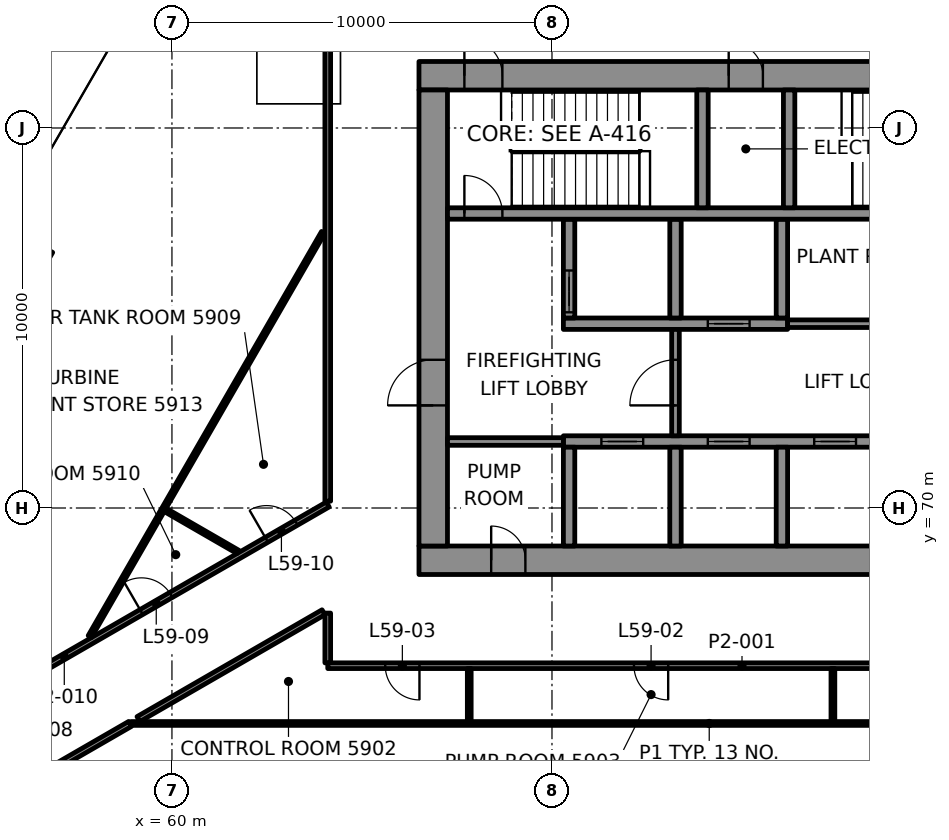
"""IFC4 building model, lengths in metres.
Left out: names, types, materials, properties, quantities, classifications, styles, units other than length and angle.
Written with IfcOpenShell. Run it as: python <this file> out.ifc"""

import sys

from ifc_helpers import new_model, si_unit, direction, frame, frame_2d, origin, origin_2d, place, context, subcontext, project, spatial, rectangle, hollow_rectangle, extrude, element, fill, save


model = new_model("IFC4")
c1 = context("Model", 3, precision=1e-05, world=origin(), true_north=direction((0.0, 1.0)))
c2 = subcontext(c1, "Body", "Model", "MODEL_VIEW")
j1 = project(units=[si_unit("LENGTHUNIT", "METRE"), si_unit("PLANEANGLEUNIT", "RADIAN")], contexts=[c1])
p1 = place(None, origin())
s1 = spatial("IfcSite", under=j1, at=p1, CompositionType="ELEMENT")
p2 = place(p1, origin())
s2 = spatial("IfcBuilding", under=s1, at=p2, CompositionType="ELEMENT")
p3 = place(p2, frame((0.0, 0.0, 252.1)))
s3 = spatial("IfcBuildingStorey", under=s2, at=p3, CompositionType="ELEMENT", Elevation=252.1)
p4 = place(p3, frame((56.229, 76.628, -0.0), z_axis=(0.0, 0.0, 1.0), x_axis=(-0.5, -0.866025403784, 0.0)))
e1 = element("IfcColumn", 1, at=p4, inside=s3, PredefinedType="COLUMN", context=c2, shape_type="SweptSolid", body=[
    extrude(hollow_rectangle(XDim=0.8, YDim=1.0, WallThickness=0.05, at=origin_2d()), origin(), (0.0, 0.0, 1.0), 4.5),
])
p5 = place(p3, frame((66.5, 68.625, 0.0), z_axis=(0.0, 0.0, 1.0), x_axis=(1.0, 0.0, 0.0)))
e2 = element("IfcWall", 2, at=p5, inside=s3, PredefinedType="SHEAR", context=c2, shape_type="SweptSolid", body=[
    extrude(rectangle(XDim=17.0, YDim=0.75, at=frame_2d((8.5, 0.0))), origin(), (0.0, 0.0, 1.0), 4.3),
])
p6 = place(p5, frame((1.9, 0.0, 0.0)))
e3 = element("IfcOpeningElement", 3, at=p6, cuts=e2, PredefinedType="OPENING", context=c2, shape_type="SweptSolid", body=[
    extrude(rectangle(XDim=0.9, YDim=2.1, at=frame_2d((0.45, 1.05))), frame((0.0, 0.385, 0.0), z_axis=(0.0, -1.0, 0.0), x_axis=(1.0, 0.0, 0.0)), (0.0, 0.0, 1.0), 0.77),
])
p7 = place(p3, frame((66.5, 81.375, 0.0), z_axis=(0.0, 0.0, 1.0), x_axis=(1.0, 0.0, 0.0)))
e4 = element("IfcWall", 4, at=p7, inside=s3, PredefinedType="SHEAR", context=c2, shape_type="SweptSolid", body=[
    extrude(rectangle(XDim=17.0, YDim=0.75, at=frame_2d((8.5, 0.0))), origin(), (0.0, 0.0, 1.0), 4.3),
])
p8 = place(p7, frame((1.195, 0.0, 0.0)))
e5 = element("IfcOpeningElement", 5, at=p8, cuts=e4, PredefinedType="OPENING", context=c2, shape_type="SweptSolid", body=[
    extrude(rectangle(XDim=1.0, YDim=2.1, at=frame_2d((0.5, 1.05))), frame((0.0, 0.385, 0.0), z_axis=(0.0, -1.0, 0.0), x_axis=(1.0, 0.0, 0.0)), (0.0, 0.0, 1.0), 0.77),
])
p9 = place(p7, frame((15.005, 0.0, 0.0)))
e6 = element("IfcOpeningElement", 6, at=p9, cuts=e4, PredefinedType="OPENING", context=c2, shape_type="SweptSolid", body=[
    extrude(rectangle(XDim=1.0, YDim=2.1, at=frame_2d((0.5, 1.05))), frame((0.0, 0.385, 0.0), z_axis=(0.0, -1.0, 0.0), x_axis=(1.0, 0.0, 0.0)), (0.0, 0.0, 1.0), 0.77),
])
p10 = place(p7, frame((8.15, 0.0, 0.0)))
e7 = element("IfcOpeningElement", 7, at=p10, cuts=e4, PredefinedType="OPENING", context=c2, shape_type="SweptSolid", body=[
    extrude(rectangle(XDim=0.9, YDim=2.1, at=frame_2d((0.45, 1.05))), frame((0.0, 0.385, 0.0), z_axis=(0.0, -1.0, 0.0), x_axis=(1.0, 0.0, 0.0)), (0.0, 0.0, 1.0), 0.77),
])
p11 = place(p3, frame((66.875, 69.0, 0.0), z_axis=(0.0, 0.0, 1.0), x_axis=(0.0, 1.0, 0.0)))
e8 = element("IfcWall", 8, at=p11, inside=s3, PredefinedType="SHEAR", context=c2, shape_type="SweptSolid", body=[
    extrude(rectangle(XDim=12.0, YDim=0.75, at=frame_2d((6.0, 0.0))), origin(), (0.0, 0.0, 1.0), 4.3),
])
p12 = place(p11, frame((3.7, 0.0, 0.0)))
e9 = element("IfcOpeningElement", 9, at=p12, cuts=e8, PredefinedType="OPENING", context=c2, shape_type="SweptSolid", body=[
    extrude(rectangle(XDim=1.2, YDim=2.1, at=frame_2d((0.6, 1.05))), frame((0.0, 0.385, 0.0), z_axis=(0.0, -1.0, 0.0), x_axis=(1.0, 0.0, 0.0)), (0.0, 0.0, 1.0), 0.77),
])
p13 = place(p3, frame((70.3, 71.75, 0.0), z_axis=(0.0, 0.0, 1.0), x_axis=(1.0, 0.0, 0.0)))
e10 = element("IfcWall", 10, at=p13, inside=s3, PredefinedType="SHEAR", context=c2, shape_type="SweptSolid", body=[
    extrude(rectangle(XDim=11.5, YDim=0.3, at=frame_2d((5.75, 0.0))), origin(), (0.0, 0.0, 1.0), 4.3),
])
p14 = place(p13, frame((1.0, 0.0, 0.0)))
e11 = element("IfcOpeningElement", 11, at=p14, cuts=e10, PredefinedType="OPENING", context=c2, shape_type="SweptSolid", body=[
    extrude(rectangle(XDim=1.1, YDim=2.1, at=frame_2d((0.55, 1.05))), frame((0.0, 0.16, 0.0), z_axis=(0.0, -1.0, 0.0), x_axis=(1.0, 0.0, 0.0)), (0.0, 0.0, 1.0), 0.32),
])
p15 = place(p13, frame((3.8, 0.0, 0.0)))
e12 = element("IfcOpeningElement", 12, at=p15, cuts=e10, PredefinedType="OPENING", context=c2, shape_type="SweptSolid", body=[
    extrude(rectangle(XDim=1.1, YDim=2.1, at=frame_2d((0.55, 1.05))), frame((0.0, 0.16, 0.0), z_axis=(0.0, -1.0, 0.0), x_axis=(1.0, 0.0, 0.0)), (0.0, 0.0, 1.0), 0.32),
])
p16 = place(p13, frame((6.6, 0.0, 0.0)))
e13 = element("IfcOpeningElement", 13, at=p16, cuts=e10, PredefinedType="OPENING", context=c2, shape_type="SweptSolid", body=[
    extrude(rectangle(XDim=1.1, YDim=2.1, at=frame_2d((0.55, 1.05))), frame((0.0, 0.16, 0.0), z_axis=(0.0, -1.0, 0.0), x_axis=(1.0, 0.0, 0.0)), (0.0, 0.0, 1.0), 0.32),
])
p17 = place(p13, frame((9.4, 0.0, 0.0)))
e14 = element("IfcOpeningElement", 14, at=p17, cuts=e10, PredefinedType="OPENING", context=c2, shape_type="SweptSolid", body=[
    extrude(rectangle(XDim=1.1, YDim=2.1, at=frame_2d((0.55, 1.05))), frame((0.0, 0.16, 0.0), z_axis=(0.0, -1.0, 0.0), x_axis=(1.0, 0.0, 0.0)), (0.0, 0.0, 1.0), 0.32),
])
p18 = place(p3, frame((70.3, 74.85, 0.0), z_axis=(0.0, 0.0, 1.0), x_axis=(1.0, 0.0, 0.0)))
e15 = element("IfcWall", 15, at=p18, inside=s3, PredefinedType="SHEAR", context=c2, shape_type="SweptSolid", body=[
    extrude(rectangle(XDim=5.9, YDim=0.3, at=frame_2d((2.95, 0.0))), origin(), (0.0, 0.0, 1.0), 4.3),
])
p19 = place(p18, frame((3.8, 0.0, 0.0)))
e16 = element("IfcOpeningElement", 16, at=p19, cuts=e15, PredefinedType="OPENING", context=c2, shape_type="SweptSolid", body=[
    extrude(rectangle(XDim=1.1, YDim=2.1, at=frame_2d((0.55, 1.05))), frame((0.0, 0.16, 0.0), z_axis=(0.0, -1.0, 0.0), x_axis=(1.0, 0.0, 0.0)), (0.0, 0.0, 1.0), 0.32),
])
p20 = place(p3, frame((70.45, 69.0, 0.0), z_axis=(0.0, 0.0, 1.0), x_axis=(0.0, 1.0, 0.0)))
e17 = element("IfcWall", 17, at=p20, inside=s3, PredefinedType="SHEAR", context=c2, shape_type="SweptSolid", body=[
    extrude(rectangle(XDim=2.6, YDim=0.3, at=frame_2d((1.3, 0.0))), origin(), (0.0, 0.0, 1.0), 4.3),
])
p21 = place(p3, frame((70.45, 75.0, 0.0), z_axis=(0.0, 0.0, 1.0), x_axis=(0.0, 1.0, 0.0)))
e18 = element("IfcWall", 18, at=p21, inside=s3, PredefinedType="SHEAR", context=c2, shape_type="SweptSolid", body=[
    extrude(rectangle(XDim=2.6, YDim=0.3, at=frame_2d((1.3, 0.0))), origin(), (0.0, 0.0, 1.0), 4.3),
])
p22 = place(p21, frame((0.15, 0.0, 0.0)))
e19 = element("IfcOpeningElement", 19, at=p22, cuts=e18, PredefinedType="OPENING", context=c2, shape_type="SweptSolid", body=[
    extrude(rectangle(XDim=1.1, YDim=2.1, at=frame_2d((0.55, 1.05))), frame((0.0, 0.16, 0.0), z_axis=(0.0, -1.0, 0.0), x_axis=(1.0, 0.0, 0.0)), (0.0, 0.0, 1.0), 0.32),
])
for number, where, z_axis, x_axis in (
    (20, (73.25, 69.0, 0.0), (0.0, 0.0, 1.0), (0.0, 1.0, 0.0)),
    (21, (73.25, 75.0, 0.0), (0.0, 0.0, 1.0), (0.0, 1.0, 0.0)),
    (22, (76.05, 69.0, 0.0), (0.0, 0.0, 1.0), (0.0, 1.0, 0.0)),
    (23, (76.05, 75.0, 0.0), (0.0, 0.0, 1.0), (0.0, 1.0, 0.0)),
):
    element("IfcWall", number, at=place(p3, frame(where, z_axis=z_axis, x_axis=x_axis)), inside=s3, PredefinedType="SHEAR", context=c2, shape_type="SweptSolid", body=[
        extrude(rectangle(XDim=2.6, YDim=0.3, at=frame_2d((1.3, 0.0))), origin(), (0.0, 0.0, 1.0), 4.3),
    ])
p23 = place(p3, frame((67.25, 77.75, 0.0), z_axis=(0.0, 0.0, 1.0), x_axis=(1.0, 0.0, 0.0)))
e24 = element("IfcWall", 24, at=p23, inside=s3, PredefinedType="SHEAR", context=c2, shape_type="SweptSolid", body=[
    extrude(rectangle(XDim=15.5, YDim=0.3, at=frame_2d((7.75, 0.0))), origin(), (0.0, 0.0, 1.0), 4.3),
])
p24 = place(p23, frame((0.445, 0.0, 0.0)))
e25 = element("IfcOpeningElement", 25, at=p24, cuts=e24, PredefinedType="OPENING", context=c2, shape_type="SweptSolid", body=[
    extrude(rectangle(XDim=1.0, YDim=2.1, at=frame_2d((0.5, 1.05))), frame((0.0, 0.16, 0.0), z_axis=(0.0, -1.0, 0.0), x_axis=(1.0, 0.0, 0.0)), (0.0, 0.0, 1.0), 0.32),
])
for number, where, z_axis, x_axis in (
    (26, (73.96, 77.9, 0.0), (0.0, 0.0, 1.0), (0.0, 1.0, 0.0)),
    (27, (76.24, 77.9, 0.0), (0.0, 0.0, 1.0), (0.0, 1.0, 0.0)),
):
    element("IfcWall", number, at=place(p3, frame(where, z_axis=z_axis, x_axis=x_axis)), inside=s3, PredefinedType="SHEAR", context=c2, shape_type="SweptSolid", body=[
        extrude(rectangle(XDim=3.1, YDim=0.3, at=frame_2d((1.55, 0.0))), origin(), (0.0, 0.0, 1.0), 4.3),
    ])
p25 = place(p3, frame((58.921, 64.33, 0.0), z_axis=(0.0, 0.0, 1.0), x_axis=(1.0, 0.0, 0.0)))
e28 = element("IfcWall", 28, at=p25, inside=s3, PredefinedType="PARTITIONING", context=c2, shape_type="SweptSolid", body=[
    extrude(rectangle(XDim=30.434, YDim=0.1, at=frame_2d((15.217, 0.0))), origin(), (0.0, 0.0, 1.0), 3.7),
])
p26 = place(p3, frame((85.9, 65.85, 0.0), z_axis=(0.0, 0.0, 1.0), x_axis=(-1.0, 0.0, 0.0)))
e29 = element("IfcWall", 29, at=p26, inside=s3, PredefinedType="PARTITIONING", context=c2, shape_type="SweptSolid", body=[
    extrude(rectangle(XDim=21.8, YDim=0.15, at=frame_2d((10.9, 0.0))), origin(), (0.0, 0.0, 1.0), 3.7),
])
p27 = place(p26, frame((3.905, 0.0, 0.0)))
e30 = element("IfcOpeningElement", 30, at=p27, cuts=e29, PredefinedType="OPENING", context=c2, shape_type="SweptSolid", body=[
    extrude(rectangle(XDim=0.9, YDim=2.1, at=frame_2d((0.45, 1.05))), frame((0.0, 0.085, 0.0), z_axis=(0.0, -1.0, 0.0), x_axis=(1.0, 0.0, 0.0)), (0.0, 0.0, 1.0), 0.17),
])
p28 = place(p26, frame((12.843, 0.0, 0.0)))
e31 = element("IfcOpeningElement", 31, at=p28, cuts=e29, PredefinedType="OPENING", context=c2, shape_type="SweptSolid", body=[
    extrude(rectangle(XDim=0.9, YDim=2.1, at=frame_2d((0.45, 1.05))), frame((0.0, 0.085, 0.0), z_axis=(0.0, -1.0, 0.0), x_axis=(1.0, 0.0, 0.0)), (0.0, 0.0, 1.0), 0.17),
])
p29 = place(p26, frame((19.387, 0.0, 0.0)))
e32 = element("IfcOpeningElement", 32, at=p29, cuts=e29, PredefinedType="OPENING", context=c2, shape_type="SweptSolid", body=[
    extrude(rectangle(XDim=0.9, YDim=2.1, at=frame_2d((0.45, 1.05))), frame((0.0, 0.085, 0.0), z_axis=(0.0, -1.0, 0.0), x_axis=(1.0, 0.0, 0.0)), (0.0, 0.0, 1.0), 0.17),
])
p30 = place(p3, frame((58.899, 64.318, 0.0), z_axis=(0.0, 0.0, 1.0), x_axis=(-0.866035440363, -0.499982615733, 0.0)))
e33 = element("IfcWall", 33, at=p30, inside=s3, PredefinedType="PARTITIONING", context=c2, shape_type="SweptSolid", body=[
    extrude(rectangle(XDim=7.419, YDim=0.15, at=frame_2d((3.709, 0.0))), origin(), (0.0, 0.0, 1.0), 3.7),
])
p31 = place(p30, frame((3.3, 0.0, 0.0)))
e34 = element("IfcOpeningElement", 34, at=p31, cuts=e33, PredefinedType="OPENING", context=c2, shape_type="SweptSolid", body=[
    extrude(rectangle(XDim=1.2, YDim=2.1, at=frame_2d((0.6, 1.05))), frame((0.0, 0.085, 0.0), z_axis=(0.0, -1.0, 0.0), x_axis=(1.0, 0.0, 0.0)), (0.0, 0.0, 1.0), 0.17),
])
p32 = place(p3, frame((50.234, 62.087, 0.0), z_axis=(0.0, 0.0, 1.0), x_axis=(0.866022819081, 0.500004476811, 0.0)))
e35 = element("IfcWall", 35, at=p32, inside=s3, PredefinedType="PARTITIONING", context=c2, shape_type="SweptSolid", body=[
    extrude(rectangle(XDim=16.011, YDim=0.15, at=frame_2d((8.005, 0.0))), origin(), (0.0, 0.0, 1.0), 3.7),
])
p33 = place(p32, frame((10.35, 0.0, 0.0)))
e36 = element("IfcOpeningElement", 36, at=p33, cuts=e35, PredefinedType="OPENING", context=c2, shape_type="SweptSolid", body=[
    extrude(rectangle(XDim=0.9, YDim=2.1, at=frame_2d((0.45, 1.05))), frame((0.0, 0.085, 0.0), z_axis=(0.0, -1.0, 0.0), x_axis=(1.0, 0.0, 0.0)), (0.0, 0.0, 1.0), 0.17),
])
p34 = place(p32, frame((14.153, 0.0, 0.0)))
e37 = element("IfcOpeningElement", 37, at=p34, cuts=e35, PredefinedType="OPENING", context=c2, shape_type="SweptSolid", body=[
    extrude(rectangle(XDim=0.9, YDim=2.1, at=frame_2d((0.45, 1.05))), frame((0.0, 0.085, 0.0), z_axis=(0.0, -1.0, 0.0), x_axis=(1.0, 0.0, 0.0)), (0.0, 0.0, 1.0), 0.17),
])
p35 = place(p3, frame((57.839, 66.616, 0.0), z_axis=(0.0, 0.0, 1.0), x_axis=(0.500008659119, 0.866020404382, 0.0)))
e38 = element("IfcWall", 38, at=p35, inside=s3, PredefinedType="PARTITIONING", context=c2, shape_type="SweptSolid", body=[
    extrude(rectangle(XDim=12.282, YDim=0.1, at=frame_2d((6.141, 0.0))), origin(), (0.0, 0.0, 1.0), 3.7),
])
for number, where, z_axis, x_axis in (
    (39, (77.392, 64.39, 0.0), (0.0, 0.0, 1.0), (0.0, 1.0, 0.0)),
    (40, (67.823, 64.39, 0.0), (0.0, 0.0, 1.0), (0.0, 1.0, 0.0)),
):
    element("IfcWall", number, at=place(p3, frame(where, z_axis=z_axis, x_axis=x_axis)), inside=s3, PredefinedType="PARTITIONING", context=c2, shape_type="SweptSolid", body=[
        extrude(rectangle(XDim=1.385, YDim=0.1, at=frame_2d((0.692, 0.0))), origin(), (0.0, 0.0, 1.0), 3.7),
    ])
p36 = place(p3, frame((64.1, 65.925, 0.0), z_axis=(0.0, 0.0, 1.0), x_axis=(0.0, 1.0, 0.0)))
e41 = element("IfcWall", 41, at=p36, inside=s3, PredefinedType="PARTITIONING", context=c2, shape_type="SweptSolid", body=[
    extrude(rectangle(XDim=1.31, YDim=0.15, at=frame_2d((0.655, 0.0))), origin(), (0.0, 0.0, 1.0), 3.7),
])
p37 = place(p3, frame((64.1, 70.179, 0.0), z_axis=(0.0, 0.0, 1.0), x_axis=(0.0, 1.0, 0.0)))
e42 = element("IfcWall", 42, at=p37, inside=s3, PredefinedType="PARTITIONING", context=c2, shape_type="SweptSolid", body=[
    extrude(rectangle(XDim=13.971, YDim=0.15, at=frame_2d((6.985, 0.0))), origin(), (0.0, 0.0, 1.0), 3.7),
])
p38 = place(p3, frame((61.736, 68.844, 0.0), z_axis=(0.0, 0.0, 1.0), x_axis=(-0.866023045711, 0.500004084281, 0.0)))
e43 = element("IfcWall", 43, at=p38, inside=s3, PredefinedType="PARTITIONING", context=c2, shape_type="SweptSolid", body=[
    extrude(rectangle(XDim=2.201, YDim=0.1, at=frame_2d((1.101, 0.0))), origin(), (0.0, 0.0, 1.0), 3.7),
])
p39 = place(p3, frame((59.118, 64.445, 0.0), z_axis=(0.0, 0.0, 1.0), x_axis=(0.866030125237, 0.499991822116, 0.0)))
e44 = element("IfcWall", 44, at=p39, inside=s3, PredefinedType="PARTITIONING", context=c2, shape_type="SweptSolid", body=[
    extrude(rectangle(XDim=5.623, YDim=0.15, at=frame_2d((2.811, 0.0))), origin(), (0.0, 0.0, 1.0), 3.7),
])
p40 = place(p3, frame((67.25, 71.75, 0.0), z_axis=(0.0, 0.0, 1.0), x_axis=(1.0, 0.0, 0.0)))
e45 = element("IfcWall", 45, at=p40, inside=s3, PredefinedType="PARTITIONING", context=c2, shape_type="SweptSolid", body=[
    extrude(rectangle(XDim=3.05, YDim=0.2, at=frame_2d((1.525, 0.0))), origin(), (0.0, 0.0, 1.0), 4.3),
])
p41 = place(p3, frame((76.2, 74.85, 0.0), z_axis=(0.0, 0.0, 1.0), x_axis=(1.0, 0.0, 0.0)))
e46 = element("IfcWall", 46, at=p41, inside=s3, PredefinedType="PARTITIONING", context=c2, shape_type="SweptSolid", body=[
    extrude(rectangle(XDim=6.55, YDim=0.2, at=frame_2d((3.275, 0.0))), origin(), (0.0, 0.0, 1.0), 4.3),
])
p42 = place(p41, frame((2.2, 0.0, 0.0)))
e47 = element("IfcOpeningElement", 47, at=p42, cuts=e46, PredefinedType="OPENING", context=c2, shape_type="SweptSolid", body=[
    extrude(rectangle(XDim=0.9, YDim=2.1, at=frame_2d((0.45, 1.05))), frame((0.0, 0.11, 0.0), z_axis=(0.0, -1.0, 0.0), x_axis=(1.0, 0.0, 0.0)), (0.0, 0.0, 1.0), 0.22),
])
p43 = place(p3, frame((73.25, 71.9, 0.0), z_axis=(0.0, 0.0, 1.0), x_axis=(0.0, 1.0, 0.0)))
e48 = element("IfcWall", 48, at=p43, inside=s3, PredefinedType="PARTITIONING", context=c2, shape_type="SweptSolid", body=[
    extrude(rectangle(XDim=2.8, YDim=0.2, at=frame_2d((1.4, 0.0))), origin(), (0.0, 0.0, 1.0), 4.3),
])
p44 = place(p43, frame((0.8, 0.0, 0.0)))
e49 = element("IfcOpeningElement", 49, at=p44, cuts=e48, PredefinedType="OPENING", context=c2, shape_type="SweptSolid", body=[
    extrude(rectangle(XDim=1.2, YDim=2.1, at=frame_2d((0.6, 1.05))), frame((0.0, 0.11, 0.0), z_axis=(0.0, -1.0, 0.0), x_axis=(1.0, 0.0, 0.0)), (0.0, 0.0, 1.0), 0.22),
])
p45 = place(p28, origin())
e50 = element("IfcDoor", 50, at=p45, inside=s3, OperationType="SINGLE_SWING_LEFT", PredefinedType="DOOR", context=c2, shape_type="SweptSolid", body=[
    extrude(rectangle(XDim=0.9, YDim=2.1, at=frame_2d((0.45, 1.05))), frame((0.0, 0.025, 0.0), z_axis=(0.0, -1.0, 0.0), x_axis=(1.0, 0.0, 0.0)), (0.0, 0.0, 1.0), 0.05),
])
fill(e31, e50)
p46 = place(p29, origin())
e51 = element("IfcDoor", 51, at=p46, inside=s3, OperationType="SINGLE_SWING_RIGHT", PredefinedType="DOOR", context=c2, shape_type="SweptSolid", body=[
    extrude(rectangle(XDim=0.9, YDim=2.1, at=frame_2d((0.45, 1.05))), frame((0.0, 0.025, 0.0), z_axis=(0.0, -1.0, 0.0), x_axis=(1.0, 0.0, 0.0)), (0.0, 0.0, 1.0), 0.05),
])
fill(e32, e51)
p47 = place(p33, origin())
e52 = element("IfcDoor", 52, at=p47, inside=s3, OperationType="SINGLE_SWING_LEFT", PredefinedType="DOOR", context=c2, shape_type="SweptSolid", body=[
    extrude(rectangle(XDim=0.9, YDim=2.1, at=frame_2d((0.45, 1.05))), frame((0.0, 0.025, 0.0), z_axis=(0.0, -1.0, 0.0), x_axis=(1.0, 0.0, 0.0)), (0.0, 0.0, 1.0), 0.05),
])
fill(e36, e52)
p48 = place(p34, origin())
e53 = element("IfcDoor", 53, at=p48, inside=s3, OperationType="SINGLE_SWING_RIGHT", PredefinedType="DOOR", context=c2, shape_type="SweptSolid", body=[
    extrude(rectangle(XDim=0.9, YDim=2.1, at=frame_2d((0.45, 1.05))), frame((0.0, 0.025, 0.0), z_axis=(0.0, -1.0, 0.0), x_axis=(1.0, 0.0, 0.0)), (0.0, 0.0, 1.0), 0.05),
])
fill(e37, e53)
p49 = place(p14, origin())
e54 = element("IfcDoor", 54, at=p49, inside=s3, OperationType="DOUBLE_DOOR_SLIDING", PredefinedType="DOOR", context=c2, shape_type="SweptSolid", body=[
    extrude(rectangle(XDim=1.1, YDim=2.1, at=frame_2d((0.55, 1.05))), frame((0.0, 0.025, 0.0), z_axis=(0.0, -1.0, 0.0), x_axis=(1.0, 0.0, 0.0)), (0.0, 0.0, 1.0), 0.05),
])
fill(e11, e54)
p50 = place(p15, origin())
e55 = element("IfcDoor", 55, at=p50, inside=s3, OperationType="DOUBLE_DOOR_SLIDING", PredefinedType="DOOR", context=c2, shape_type="SweptSolid", body=[
    extrude(rectangle(XDim=1.1, YDim=2.1, at=frame_2d((0.55, 1.05))), frame((0.0, 0.025, 0.0), z_axis=(0.0, -1.0, 0.0), x_axis=(1.0, 0.0, 0.0)), (0.0, 0.0, 1.0), 0.05),
])
fill(e12, e55)
p51 = place(p16, origin())
e56 = element("IfcDoor", 56, at=p51, inside=s3, OperationType="DOUBLE_DOOR_SLIDING", PredefinedType="DOOR", context=c2, shape_type="SweptSolid", body=[
    extrude(rectangle(XDim=1.1, YDim=2.1, at=frame_2d((0.55, 1.05))), frame((0.0, 0.025, 0.0), z_axis=(0.0, -1.0, 0.0), x_axis=(1.0, 0.0, 0.0)), (0.0, 0.0, 1.0), 0.05),
])
fill(e13, e56)
p52 = place(p22, origin())
e57 = element("IfcDoor", 57, at=p52, inside=s3, OperationType="DOUBLE_DOOR_SLIDING", PredefinedType="DOOR", context=c2, shape_type="SweptSolid", body=[
    extrude(rectangle(XDim=1.1, YDim=2.1, at=frame_2d((0.55, 1.05))), frame((0.0, 0.025, 0.0), z_axis=(0.0, -1.0, 0.0), x_axis=(1.0, 0.0, 0.0)), (0.0, 0.0, 1.0), 0.05),
])
fill(e19, e57)
p53 = place(p19, origin())
e58 = element("IfcDoor", 58, at=p53, inside=s3, OperationType="DOUBLE_DOOR_SLIDING", PredefinedType="DOOR", context=c2, shape_type="SweptSolid", body=[
    extrude(rectangle(XDim=1.1, YDim=2.1, at=frame_2d((0.55, 1.05))), frame((0.0, 0.025, 0.0), z_axis=(0.0, -1.0, 0.0), x_axis=(1.0, 0.0, 0.0)), (0.0, 0.0, 1.0), 0.05),
])
fill(e16, e58)
p54 = place(p24, origin())
e59 = element("IfcDoor", 59, at=p54, inside=s3, OperationType="SINGLE_SWING_LEFT", PredefinedType="DOOR", context=c2, shape_type="SweptSolid", body=[
    extrude(rectangle(XDim=1.0, YDim=2.1, at=frame_2d((0.5, 1.05))), frame((0.0, 0.025, 0.0), z_axis=(0.0, -1.0, 0.0), x_axis=(1.0, 0.0, 0.0)), (0.0, 0.0, 1.0), 0.05),
])
fill(e25, e59)
p55 = place(p8, origin())
e60 = element("IfcDoor", 60, at=p55, inside=s3, OperationType="SINGLE_SWING_RIGHT", PredefinedType="DOOR", context=c2, shape_type="SweptSolid", body=[
    extrude(rectangle(XDim=1.0, YDim=2.1, at=frame_2d((0.5, 1.05))), frame((0.0, 0.095, 0.0), z_axis=(0.0, -1.0, 0.0), x_axis=(1.0, 0.0, 0.0)), (0.0, 0.0, 1.0), 0.19),
])
fill(e5, e60)
p56 = place(p44, origin())
e61 = element("IfcDoor", 61, at=p56, inside=s3, OperationType="SINGLE_SWING_LEFT", PredefinedType="DOOR", context=c2, shape_type="SweptSolid", body=[
    extrude(rectangle(XDim=1.2, YDim=2.1, at=frame_2d((0.6, 1.05))), frame((0.0, 0.025, 0.0), z_axis=(0.0, -1.0, 0.0), x_axis=(1.0, 0.0, 0.0)), (0.0, 0.0, 1.0), 0.05),
])
fill(e49, e61)
p57 = place(p12, origin())
e62 = element("IfcDoor", 62, at=p57, inside=s3, OperationType="SINGLE_SWING_RIGHT", PredefinedType="DOOR", context=c2, shape_type="SweptSolid", body=[
    extrude(rectangle(XDim=1.2, YDim=2.1, at=frame_2d((0.6, 1.05))), frame((0.0, 0.095, 0.0), z_axis=(0.0, -1.0, 0.0), x_axis=(1.0, 0.0, 0.0)), (0.0, 0.0, 1.0), 0.19),
])
fill(e9, e62)
p58 = place(p6, origin())
e63 = element("IfcDoor", 63, at=p58, inside=s3, OperationType="SINGLE_SWING_RIGHT", PredefinedType="DOOR", context=c2, shape_type="SweptSolid", body=[
    extrude(rectangle(XDim=0.9, YDim=2.1, at=frame_2d((0.45, 1.05))), frame((0.0, 0.095, 0.0), z_axis=(0.0, -1.0, 0.0), x_axis=(1.0, 0.0, 0.0)), (0.0, 0.0, 1.0), 0.19),
])
fill(e3, e63)
p59 = place(p10, origin())
e64 = element("IfcDoor", 64, at=p59, inside=s3, OperationType="SINGLE_SWING_RIGHT", PredefinedType="DOOR", context=c2, shape_type="SweptSolid", body=[
    extrude(rectangle(XDim=0.9, YDim=2.1, at=frame_2d((0.45, 1.05))), frame((0.0, 0.095, 0.0), z_axis=(0.0, -1.0, 0.0), x_axis=(1.0, 0.0, 0.0)), (0.0, 0.0, 1.0), 0.19),
])
fill(e7, e64)
save(model, sys.argv[1])
